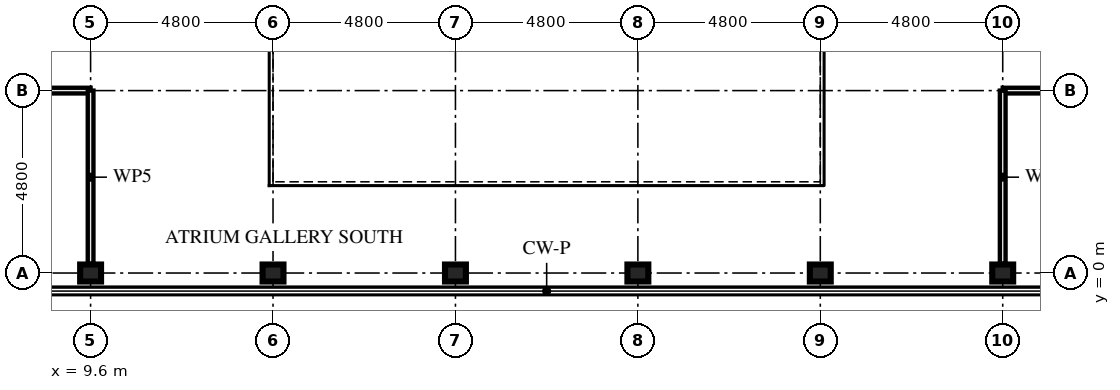
"""IFC4 building model, lengths in metres.
Left out: names, types, materials, properties, quantities, classifications, styles, units other than length and angle.
Written with IfcOpenShell. Run it as: python <this file> out.ifc"""

import sys

from ifc_helpers import new_model, si_unit, direction, frame, frame_2d, origin, origin_2d, place, context, subcontext, project, spatial, rectangle, i_section, extrude, element, save


model = new_model("IFC4")
c1 = context("Model", 3, precision=1e-05, world=origin(), true_north=direction((0.0, 1.0)))
c2 = subcontext(c1, "Body", "Model", "MODEL_VIEW")
j1 = project(units=[si_unit("LENGTHUNIT", "METRE"), si_unit("PLANEANGLEUNIT", "RADIAN")], contexts=[c1])
p1 = place(None, origin())
s1 = spatial("IfcSite", under=j1, at=p1, CompositionType="ELEMENT")
p2 = place(p1, origin())
s2 = spatial("IfcBuilding", under=s1, at=p2, CompositionType="ELEMENT")
p3 = place(p2, frame((0.0, 0.0, 18.0)))
s3 = spatial("IfcBuildingStorey", under=s2, at=p3, CompositionType="ELEMENT", Elevation=18.0)
for number, where, z_axis, x_axis in (
    (1, (9.6, 0.0, 0.0), (0.0, 0.0, 1.0), (0.0, 1.0, 0.0)),
    (2, (14.4, 0.0, 0.0), (0.0, 0.0, 1.0), (0.0, 1.0, 0.0)),
    (3, (19.2, 0.0, 0.0), (0.0, 0.0, 1.0), (0.0, 1.0, 0.0)),
    (4, (24.0, 0.0, 0.0), (0.0, 0.0, 1.0), (0.0, 1.0, 0.0)),
    (5, (28.8, 0.0, 0.0), (0.0, 0.0, 1.0), (0.0, 1.0, 0.0)),
    (6, (33.6, 0.0, 0.0), (0.0, 0.0, 1.0), (0.0, 1.0, 0.0)),
):
    element("IfcColumn", number, at=place(p3, frame(where, z_axis=z_axis, x_axis=x_axis)), inside=s3, PredefinedType="COLUMN", context=c2, shape_type="SweptSolid", body=[
        extrude(i_section(OverallWidth=0.448, OverallDepth=0.55, WebThickness=0.072, FlangeThickness=0.115, FilletRadius=0.015, at=origin_2d()), origin(), (0.0, 0.0, 1.0), 4.5),
    ])
p4 = place(p3, frame((-4.48, 4.8, 0.0), z_axis=(0.0, 0.0, 1.0), x_axis=(1.0, 0.0, 0.0)))
e7 = element("IfcWall", 7, at=p4, inside=s3, PredefinedType="PARTITIONING", context=c2, shape_type="SweptSolid", body=[
    extrude(rectangle(XDim=14.08, YDim=0.15, at=frame_2d((7.04, 0.0))), origin(), (0.0, 0.0, 1.0), 3.55),
])
p5 = place(p4, frame((8.78, 0.0, 0.0)))
e8 = element("IfcOpeningElement", 8, at=p5, cuts=e7, PredefinedType="OPENING", context=c2, shape_type="SweptSolid", body=[
    extrude(rectangle(XDim=1.0, YDim=2.4, at=frame_2d((0.5, 1.2))), frame((0.0, 0.085, 0.0), z_axis=(0.0, -1.0, 0.0), x_axis=(1.0, 0.0, 0.0)), (0.0, 0.0, 1.0), 0.171),
])
p6 = place(p3, frame((33.6, 4.8, 0.0), z_axis=(0.0, 0.0, 1.0), x_axis=(1.0, 0.0, 0.0)))
e9 = element("IfcWall", 9, at=p6, inside=s3, PredefinedType="PARTITIONING", context=c2, shape_type="SweptSolid", body=[
    extrude(rectangle(XDim=14.08, YDim=0.15, at=frame_2d((7.04, 0.0))), origin(), (0.0, 0.0, 1.0), 3.55),
])
p7 = place(p6, frame((4.3, 0.0, 0.0)))
e10 = element("IfcOpeningElement", 10, at=p7, cuts=e9, PredefinedType="OPENING", context=c2, shape_type="SweptSolid", body=[
    extrude(rectangle(XDim=1.0, YDim=2.4, at=frame_2d((0.5, 1.2))), frame((0.0, 0.085, 0.0), z_axis=(0.0, -1.0, 0.0), x_axis=(1.0, 0.0, 0.0)), (0.0, 0.0, 1.0), 0.171),
])
for number, where, z_axis, x_axis in (
    (11, (9.6, 0.244, 0.0), (0.0, 0.0, 1.0), (0.0, 1.0, 0.0)),
    (12, (33.6, 0.244, 0.0), (0.0, 0.0, 1.0), (0.0, 1.0, 0.0)),
):
    element("IfcWall", number, at=place(p3, frame(where, z_axis=z_axis, x_axis=x_axis)), inside=s3, PredefinedType="PARTITIONING", context=c2, shape_type="SweptSolid", body=[
        extrude(rectangle(XDim=4.556, YDim=0.15, at=frame_2d((2.278, 0.0))), origin(), (0.0, 0.0, 1.0), 3.55),
    ])
save(model, sys.argv[1])
